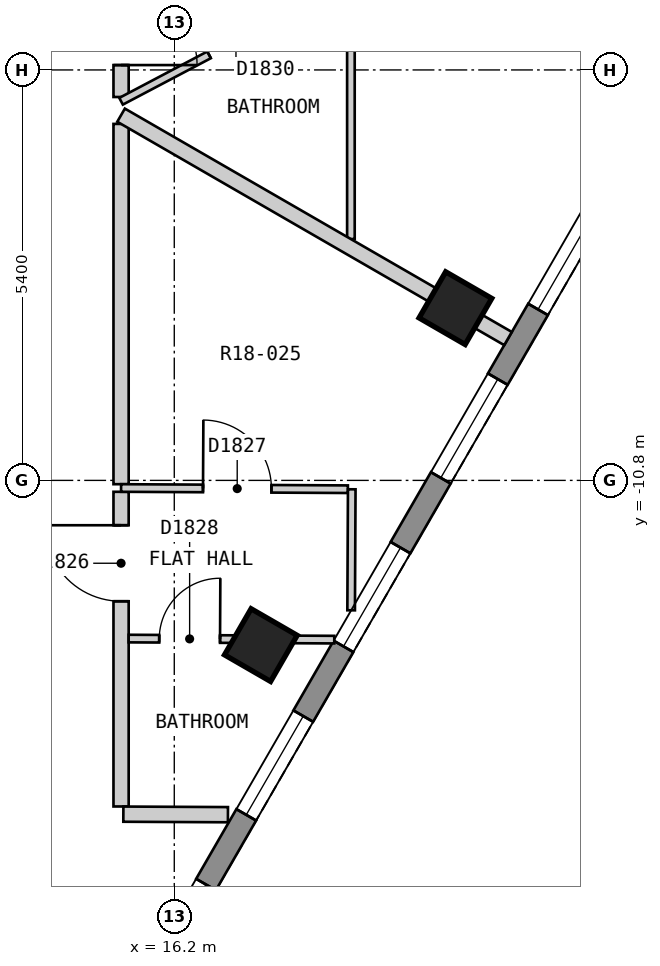
"""IFC4 building model, lengths in metres.
Left out: names, types, materials, properties, quantities, classifications, styles, units other than length and angle.
Written with IfcOpenShell. Run it as: python <this file> out.ifc"""

import sys

from ifc_helpers import new_model, si_unit, direction, frame, frame_2d, origin, origin_2d, place, context, subcontext, project, spatial, polyline, rectangle, outline, extrude, element, fill, save


model = new_model("IFC4")
c1 = context("Model", 3, precision=1e-05, world=origin(), true_north=direction((0.0, 1.0)))
c2 = subcontext(c1, "Body", "Model", "MODEL_VIEW")
j1 = project(units=[si_unit("LENGTHUNIT", "METRE"), si_unit("PLANEANGLEUNIT", "RADIAN")], contexts=[c1])
p1 = place(None, origin())
s1 = spatial("IfcSite", under=j1, at=p1, CompositionType="ELEMENT")
p2 = place(p1, origin())
s2 = spatial("IfcBuilding", under=s1, at=p2, CompositionType="ELEMENT")
p3 = place(p2, frame((0.0, 0.0, 208.8)))
s3 = spatial("IfcBuildingStorey", under=s2, at=p3, CompositionType="ELEMENT", Elevation=208.8)
for number, where, z_axis, x_axis in (
    (1, (17.339, -12.967, 0.0), (0.0, 0.0, 1.0), (0.5, 0.866, 0.0)),
    (2, (19.899, -8.534, 0.0), (0.0, 0.0, 1.0), (0.5, 0.866, 0.0)),
):
    element("IfcColumn", number, at=place(p3, frame(where, z_axis=z_axis, x_axis=x_axis)), inside=s3, PredefinedType="COLUMN", context=c2, shape_type="SweptSolid", body=[
        extrude(rectangle(XDim=0.7, YDim=0.7, at=origin_2d()), origin(), (0.0, 0.0, 1.0), 3.0),
    ])
p4 = place(p3, frame((15.285, -18.425, 0.0), z_axis=(0.0, 0.0, 1.0), x_axis=(0.500012653391, 0.866018098222, 0.0)))
e3 = element("IfcWall", 3, at=p4, inside=s3, PredefinedType="SOLIDWALL", context=c2, shape_type="SweptSolid", body=[
    extrude(outline(polyline([(0.0, -0.15), (16.628, -0.15), (16.548, 0.15), (0.08, 0.15), (0.0, -0.15)])), origin(), (0.0, 0.0, 1.0), 2.7),
])
p5 = place(p4, frame((1.165, 0.0, 0.15)))
e4 = element("IfcOpeningElement", 4, at=p5, cuts=e3, PredefinedType="OPENING", context=c2, shape_type="SweptSolid", body=[
    extrude(rectangle(XDim=1.5, YDim=2.1, at=frame_2d((0.75, 1.05))), frame((0.0, 0.16, 0.0), z_axis=(0.0, -1.0, 0.0), x_axis=(1.0, 0.0, 0.0)), (0.0, 0.0, 1.0), 0.32),
])
p6 = place(p4, frame((3.724, 0.0, 0.15)))
e5 = element("IfcOpeningElement", 5, at=p6, cuts=e3, PredefinedType="OPENING", context=c2, shape_type="SweptSolid", body=[
    extrude(rectangle(XDim=1.5, YDim=2.1, at=frame_2d((0.75, 1.05))), frame((0.0, 0.16, 0.0), z_axis=(0.0, -1.0, 0.0), x_axis=(1.0, 0.0, 0.0)), (0.0, 0.0, 1.0), 0.32),
])
p7 = place(p4, frame((6.283, 0.0, 0.15)))
e6 = element("IfcOpeningElement", 6, at=p7, cuts=e3, PredefinedType="OPENING", context=c2, shape_type="SweptSolid", body=[
    extrude(rectangle(XDim=1.5, YDim=2.1, at=frame_2d((0.75, 1.05))), frame((0.0, 0.16, 0.0), z_axis=(0.0, -1.0, 0.0), x_axis=(1.0, 0.0, 0.0)), (0.0, 0.0, 1.0), 0.32),
])
p8 = place(p4, frame((8.843, 0.0, 0.15)))
e7 = element("IfcOpeningElement", 7, at=p8, cuts=e3, PredefinedType="OPENING", context=c2, shape_type="SweptSolid", body=[
    extrude(rectangle(XDim=1.5, YDim=2.1, at=frame_2d((0.75, 1.05))), frame((0.0, 0.16, 0.0), z_axis=(0.0, -1.0, 0.0), x_axis=(1.0, 0.0, 0.0)), (0.0, 0.0, 1.0), 0.32),
])
p9 = place(p4, frame((11.402, 0.0, 0.15)))
e8 = element("IfcOpeningElement", 8, at=p9, cuts=e3, PredefinedType="OPENING", context=c2, shape_type="SweptSolid", body=[
    extrude(rectangle(XDim=1.5, YDim=2.1, at=frame_2d((0.75, 1.05))), frame((0.0, 0.16, 0.0), z_axis=(0.0, -1.0, 0.0), x_axis=(1.0, 0.0, 0.0)), (0.0, 0.0, 1.0), 0.32),
])
p10 = place(p4, frame((13.962, 0.0, 0.15)))
e9 = element("IfcOpeningElement", 9, at=p10, cuts=e3, PredefinedType="OPENING", context=c2, shape_type="SweptSolid", body=[
    extrude(rectangle(XDim=1.5, YDim=2.1, at=frame_2d((0.75, 1.05))), frame((0.0, 0.16, 0.0), z_axis=(0.0, -1.0, 0.0), x_axis=(1.0, 0.0, 0.0)), (0.0, 0.0, 1.0), 0.32),
])
p11 = place(p3, frame((15.5, -6.11, 0.0), z_axis=(0.0, 0.0, 1.0), x_axis=(0.0, -1.0, 0.0)))
e10 = element("IfcWall", 10, at=p11, inside=s3, PredefinedType="PARTITIONING", context=c2, shape_type="SweptSolid", body=[
    extrude(rectangle(XDim=4.74, YDim=0.2, at=frame_2d((2.37, 0.0))), origin(), (0.0, 0.0, 1.0), 2.7),
])
p12 = place(p3, frame((15.5, -15.09, 0.0), z_axis=(0.0, 0.0, 1.0), x_axis=(0.0, 1.0, 0.0)))
e11 = element("IfcWall", 11, at=p12, inside=s3, PredefinedType="PARTITIONING", context=c2, shape_type="SweptSolid", body=[
    extrude(rectangle(XDim=4.14, YDim=0.2, at=frame_2d((2.07, 0.0))), origin(), (0.0, 0.0, 1.0), 2.7),
])
p13 = place(p12, frame((2.7, 0.0, 0.0)))
e12 = element("IfcOpeningElement", 12, at=p13, cuts=e11, PredefinedType="OPENING", context=c2, shape_type="SweptSolid", body=[
    extrude(rectangle(XDim=1.0, YDim=2.1, at=frame_2d((0.5, 1.05))), frame((0.0, 0.11, 0.0), z_axis=(0.0, -1.0, 0.0), x_axis=(1.0, 0.0, 0.0)), (0.0, 0.0, 1.0), 0.22),
])
p14 = place(p3, frame((15.5, -5.756, 0.0), z_axis=(0.0, 0.0, 1.0), x_axis=(0.0, 1.0, 0.0)))
e13 = element("IfcWall", 13, at=p14, inside=s3, PredefinedType="PARTITIONING", context=c2, shape_type="SweptSolid", body=[
    extrude(rectangle(XDim=1.809, YDim=0.2, at=frame_2d((0.905, 0.0))), origin(), (0.0, 0.0, 1.0), 2.7),
])
p15 = place(p14, frame((0.42, 0.0, 0.0)))
e14 = element("IfcOpeningElement", 14, at=p15, cuts=e13, PredefinedType="OPENING", context=c2, shape_type="SweptSolid", body=[
    extrude(rectangle(XDim=1.0, YDim=2.1, at=frame_2d((0.5, 1.05))), frame((0.0, 0.11, 0.0), z_axis=(0.0, -1.0, 0.0), x_axis=(1.0, 0.0, 0.0)), (0.0, 0.0, 1.0), 0.22),
])
p16 = place(p3, frame((15.5, -10.9, 0.0), z_axis=(0.0, 0.0, 1.0), x_axis=(0.999985419789, -0.005400019449, 0.0)))
e15 = element("IfcWall", 15, at=p16, inside=s3, PredefinedType="PARTITIONING", context=c2, shape_type="SweptSolid", body=[
    extrude(rectangle(XDim=2.984, YDim=0.1, at=frame_2d((1.492, 0.0))), origin(), (0.0, 0.0, 1.0), 2.7),
])
p17 = place(p16, frame((1.078, 0.0, 0.0)))
e16 = element("IfcOpeningElement", 16, at=p17, cuts=e15, PredefinedType="OPENING", context=c2, shape_type="SweptSolid", body=[
    extrude(rectangle(XDim=0.9, YDim=2.1, at=frame_2d((0.45, 1.05))), frame((0.0, 0.06, 0.0), z_axis=(0.0, -1.0, 0.0), x_axis=(1.0, 0.0, 0.0)), (0.0, 0.0, 1.0), 0.12),
])
p18 = place(p3, frame((15.6, -12.881, 0.0), z_axis=(0.0, 0.0, 1.0), x_axis=(0.999986765426, -0.00514480058, 0.0)))
e17 = element("IfcWall", 17, at=p18, inside=s3, PredefinedType="PARTITIONING", context=c2, shape_type="SweptSolid", body=[
    extrude(rectangle(XDim=2.705, YDim=0.1, at=frame_2d((1.353, 0.0))), origin(), (0.0, 0.0, 1.0), 2.7),
])
p19 = place(p18, frame((0.402, 0.0, 0.0)))
e18 = element("IfcOpeningElement", 18, at=p19, cuts=e17, PredefinedType="OPENING", context=c2, shape_type="SweptSolid", body=[
    extrude(rectangle(XDim=0.8, YDim=2.1, at=frame_2d((0.4, 1.05))), frame((0.0, 0.06, 0.0), z_axis=(0.0, -1.0, 0.0), x_axis=(1.0, 0.0, 0.0)), (0.0, 0.0, 1.0), 0.12),
])
p20 = place(p3, frame((18.527, -12.509, 0.0), z_axis=(0.0, 0.0, 1.0), x_axis=(0.004907163735, 0.9999879598, 0.0)))
e19 = element("IfcWall", 19, at=p20, inside=s3, PredefinedType="PARTITIONING", context=c2, shape_type="SweptSolid", body=[
    extrude(rectangle(XDim=1.592, YDim=0.1, at=frame_2d((0.796, 0.0))), origin(), (0.0, 0.0, 1.0), 2.7),
])
p21 = place(p3, frame((18.524, -7.625, 0.0), z_axis=(0.0, 0.0, 1.0), x_axis=(0.0, 1.0, 0.0)))
e20 = element("IfcWall", 20, at=p21, inside=s3, PredefinedType="PARTITIONING", context=c2, shape_type="SweptSolid", body=[
    extrude(rectangle(XDim=5.293, YDim=0.1, at=frame_2d((2.646, 0.0))), origin(), (0.0, 0.0, 1.0), 2.7),
])
p22 = place(p21, frame((3.917, 0.0, 0.0)))
e21 = element("IfcOpeningElement", 21, at=p22, cuts=e20, PredefinedType="OPENING", context=c2, shape_type="SweptSolid", body=[
    extrude(rectangle(XDim=0.9, YDim=2.1, at=frame_2d((0.45, 1.05))), frame((0.0, 0.06, 0.0), z_axis=(0.0, -1.0, 0.0), x_axis=(1.0, 0.0, 0.0)), (0.0, 0.0, 1.0), 0.12),
])
p23 = place(p3, frame((15.5, -5.812, 0.0), z_axis=(0.0, 0.0, 1.0), x_axis=(0.884576181409, 0.46639573249, 0.0)))
e22 = element("IfcWall", 22, at=p23, inside=s3, PredefinedType="PARTITIONING", context=c2, shape_type="SweptSolid", body=[
    extrude(rectangle(XDim=3.362, YDim=0.1, at=frame_2d((1.681, 0.0))), origin(), (0.0, 0.0, 1.0), 2.7),
])
p24 = place(p23, frame((1.309, 0.0, 0.0)))
e23 = element("IfcOpeningElement", 23, at=p24, cuts=e22, PredefinedType="OPENING", context=c2, shape_type="SweptSolid", body=[
    extrude(rectangle(XDim=0.8, YDim=2.1, at=frame_2d((0.4, 1.05))), frame((0.0, 0.06, 0.0), z_axis=(0.0, -1.0, 0.0), x_axis=(1.0, 0.0, 0.0)), (0.0, 0.0, 1.0), 0.12),
])
p25 = place(p3, frame((15.53, -15.191, 0.0), z_axis=(0.0, 0.0, 1.0), x_axis=(0.999986762212, -0.005145425143, 0.0)))
e24 = element("IfcWall", 24, at=p25, inside=s3, PredefinedType="PARTITIONING", context=c2, shape_type="SweptSolid", body=[
    extrude(rectangle(XDim=1.376, YDim=0.2, at=frame_2d((0.688, 0.0))), origin(), (0.0, 0.0, 1.0), 2.7),
])
p26 = place(p3, frame((15.5, -5.995, 0.0), z_axis=(0.0, 0.0, 1.0), x_axis=(0.866052111102, -0.499953738716, 0.0)))
e25 = element("IfcWall", 25, at=p26, inside=s3, PredefinedType="PARTITIONING", context=c2, shape_type="SweptSolid", body=[
    extrude(rectangle(XDim=5.878, YDim=0.2, at=frame_2d((2.939, 0.0))), origin(), (0.0, 0.0, 1.0), 2.7),
])
p27 = place(p5, origin())
e26 = element("IfcWindow", 26, at=p27, inside=s3, PartitioningType="SINGLE_PANEL", PredefinedType="WINDOW", context=c2, shape_type="SweptSolid", body=[
    extrude(rectangle(XDim=1.5, YDim=2.1, at=frame_2d((0.75, 1.05))), frame((0.0, 0.03, 0.0), z_axis=(0.0, -1.0, 0.0), x_axis=(1.0, 0.0, 0.0)), (0.0, 0.0, 1.0), 0.06),
])
fill(e4, e26)
p28 = place(p6, origin())
e27 = element("IfcWindow", 27, at=p28, inside=s3, PartitioningType="SINGLE_PANEL", PredefinedType="WINDOW", context=c2, shape_type="SweptSolid", body=[
    extrude(rectangle(XDim=1.5, YDim=2.1, at=frame_2d((0.75, 1.05))), frame((0.0, 0.03, 0.0), z_axis=(0.0, -1.0, 0.0), x_axis=(1.0, 0.0, 0.0)), (0.0, 0.0, 1.0), 0.06),
])
fill(e5, e27)
p29 = place(p7, origin())
e28 = element("IfcWindow", 28, at=p29, inside=s3, PartitioningType="SINGLE_PANEL", PredefinedType="WINDOW", context=c2, shape_type="SweptSolid", body=[
    extrude(rectangle(XDim=1.5, YDim=2.1, at=frame_2d((0.75, 1.05))), frame((0.0, 0.03, 0.0), z_axis=(0.0, -1.0, 0.0), x_axis=(1.0, 0.0, 0.0)), (0.0, 0.0, 1.0), 0.06),
])
fill(e6, e28)
p30 = place(p8, origin())
e29 = element("IfcWindow", 29, at=p30, inside=s3, PartitioningType="SINGLE_PANEL", PredefinedType="WINDOW", context=c2, shape_type="SweptSolid", body=[
    extrude(rectangle(XDim=1.5, YDim=2.1, at=frame_2d((0.75, 1.05))), frame((0.0, 0.03, 0.0), z_axis=(0.0, -1.0, 0.0), x_axis=(1.0, 0.0, 0.0)), (0.0, 0.0, 1.0), 0.06),
])
fill(e7, e29)
p31 = place(p9, origin())
e30 = element("IfcWindow", 30, at=p31, inside=s3, PartitioningType="SINGLE_PANEL", PredefinedType="WINDOW", context=c2, shape_type="SweptSolid", body=[
    extrude(rectangle(XDim=1.5, YDim=2.1, at=frame_2d((0.75, 1.05))), frame((0.0, 0.03, 0.0), z_axis=(0.0, -1.0, 0.0), x_axis=(1.0, 0.0, 0.0)), (0.0, 0.0, 1.0), 0.06),
])
fill(e8, e30)
p32 = place(p13, origin())
e31 = element("IfcDoor", 31, at=p32, inside=s3, OperationType="SINGLE_SWING_RIGHT", PredefinedType="DOOR", context=c2, shape_type="SweptSolid", body=[
    extrude(rectangle(XDim=1.0, YDim=2.1, at=frame_2d((0.5, 1.05))), frame((0.0, 0.025, 0.0), z_axis=(0.0, -1.0, 0.0), x_axis=(1.0, 0.0, 0.0)), (0.0, 0.0, 1.0), 0.05),
])
fill(e12, e31)
p33 = place(p17, origin())
e32 = element("IfcDoor", 32, at=p33, inside=s3, OperationType="SINGLE_SWING_LEFT", PredefinedType="DOOR", context=c2, shape_type="SweptSolid", body=[
    extrude(rectangle(XDim=0.9, YDim=2.1, at=frame_2d((0.45, 1.05))), frame((0.0, 0.025, 0.0), z_axis=(0.0, -1.0, 0.0), x_axis=(1.0, 0.0, 0.0)), (0.0, 0.0, 1.0), 0.05),
])
fill(e16, e32)
p34 = place(p19, origin())
e33 = element("IfcDoor", 33, at=p34, inside=s3, OperationType="SINGLE_SWING_RIGHT", PredefinedType="DOOR", context=c2, shape_type="SweptSolid", body=[
    extrude(rectangle(XDim=0.8, YDim=2.1, at=frame_2d((0.4, 1.05))), frame((0.0, 0.025, 0.0), z_axis=(0.0, -1.0, 0.0), x_axis=(1.0, 0.0, 0.0)), (0.0, 0.0, 1.0), 0.05),
])
fill(e18, e33)
p35 = place(p15, origin())
e34 = element("IfcDoor", 34, at=p35, inside=s3, OperationType="SINGLE_SWING_LEFT", PredefinedType="DOOR", context=c2, shape_type="SweptSolid", body=[
    extrude(rectangle(XDim=1.0, YDim=2.1, at=frame_2d((0.5, 1.05))), frame((0.0, 0.025, 0.0), z_axis=(0.0, -1.0, 0.0), x_axis=(1.0, 0.0, 0.0)), (0.0, 0.0, 1.0), 0.05),
])
fill(e14, e34)
p36 = place(p24, origin())
e35 = element("IfcDoor", 35, at=p36, inside=s3, OperationType="SINGLE_SWING_RIGHT", PredefinedType="DOOR", context=c2, shape_type="SweptSolid", body=[
    extrude(rectangle(XDim=0.8, YDim=2.1, at=frame_2d((0.4, 1.05))), frame((0.0, 0.025, 0.0), z_axis=(0.0, -1.0, 0.0), x_axis=(1.0, 0.0, 0.0)), (0.0, 0.0, 1.0), 0.05),
])
fill(e23, e35)
save(model, sys.argv[1])
